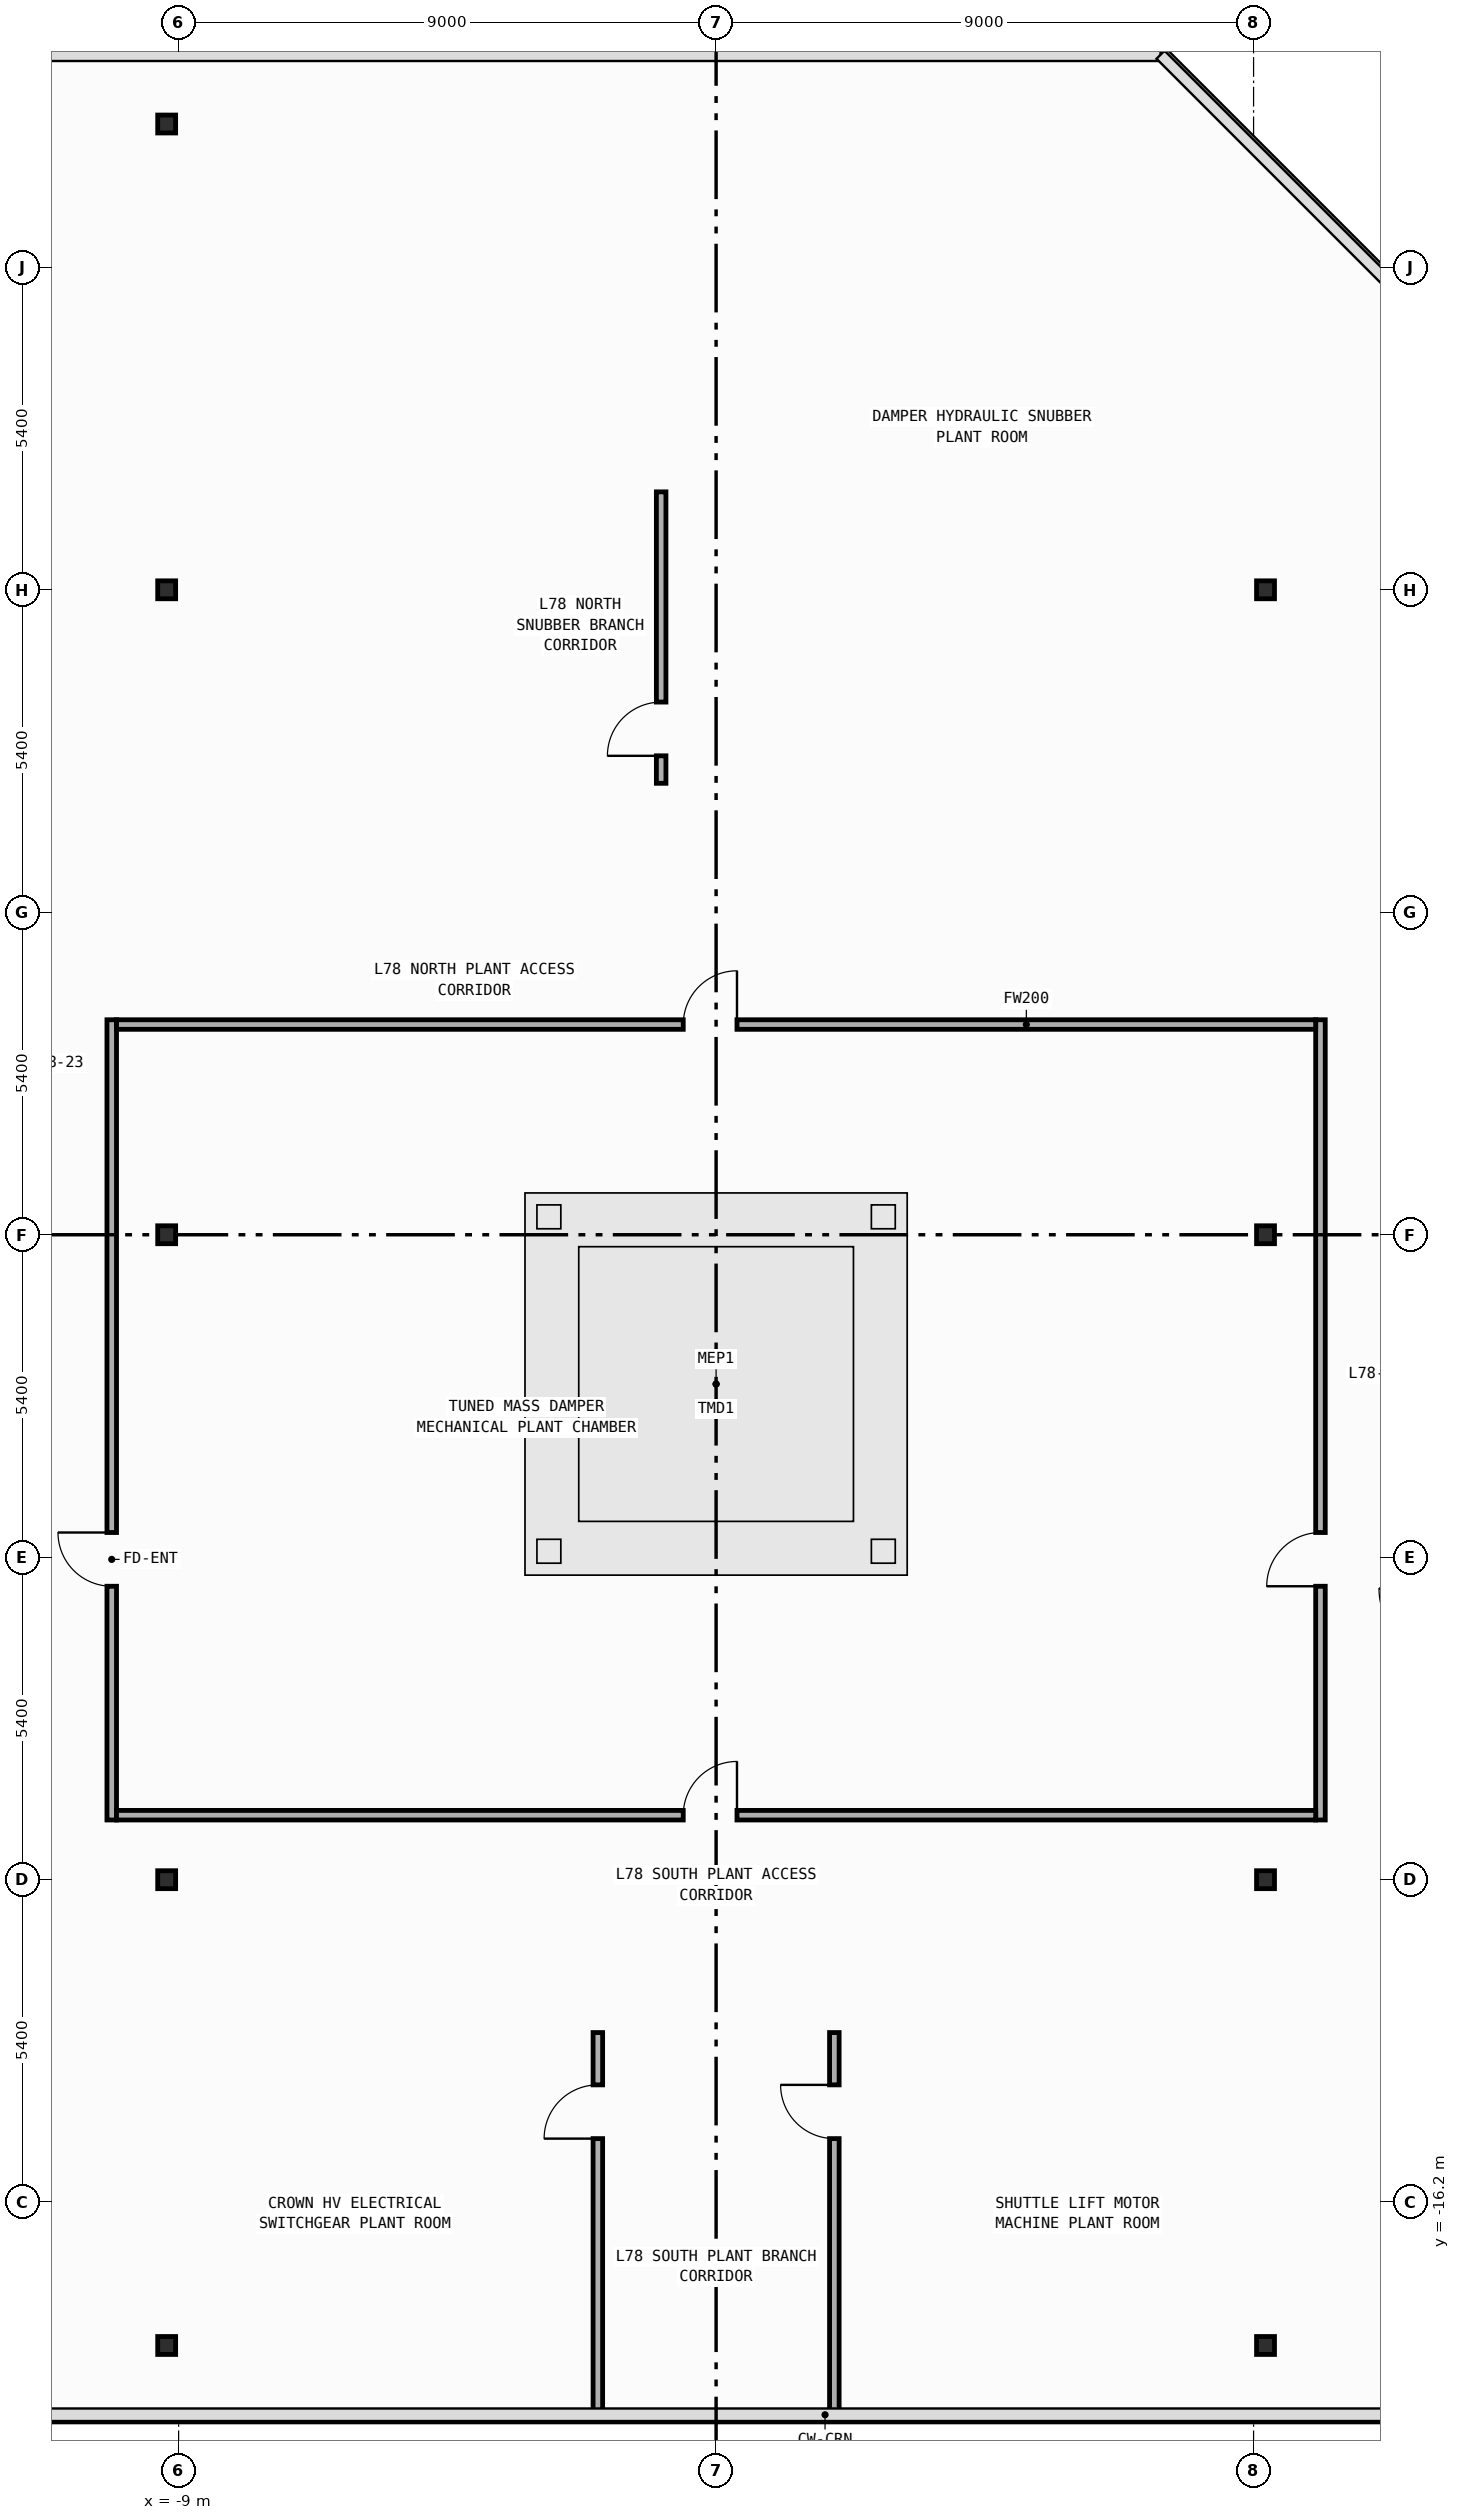
"""IFC4 building model, lengths in metres.
Left out: names, types, materials, properties, quantities, classifications, styles, units other than length and angle.
Written with IfcOpenShell. Run it as: python <this file> out.ifc"""

import sys

from ifc_helpers import new_model, si_unit, direction, frame, frame_2d, origin, origin_2d, place, context, subcontext, project, spatial, rectangle, i_section, extrude, element, fill, save


model = new_model("IFC4")
c1 = context("Model", 3, precision=1e-05, world=origin(), true_north=direction((0.0, 1.0)))
c2 = subcontext(c1, "Body", "Model", "MODEL_VIEW")
j1 = project(units=[si_unit("LENGTHUNIT", "METRE"), si_unit("PLANEANGLEUNIT", "RADIAN")], contexts=[c1])
p1 = place(None, origin())
s1 = spatial("IfcSite", under=j1, at=p1, CompositionType="ELEMENT")
p2 = place(p1, origin())
s2 = spatial("IfcBuilding", under=s1, at=p2, CompositionType="ELEMENT")
p3 = place(p2, frame((0.0, 0.0, 325.2)))
s3 = spatial("IfcBuildingStorey", under=s2, at=p3, CompositionType="ELEMENT", Elevation=325.2)
for number, where, z_axis, x_axis in (
    (1, (-9.2, -18.6, 0.0), (0.0, 0.0, 1.0), (1.0, 0.0, 0.0)),
    (2, (-9.2, -10.8, 0.0), (0.0, 0.0, 1.0), (1.0, 0.0, 0.0)),
    (3, (-9.2, 0.0, 0.0), (0.0, 0.0, 1.0), (1.0, 0.0, 0.0)),
    (4, (-9.2, 10.8, 0.0), (0.0, 0.0, 1.0), (1.0, 0.0, 0.0)),
    (5, (-9.2, 18.6, 0.0), (0.0, 0.0, 1.0), (1.0, 0.0, 0.0)),
    (6, (9.2, -18.6, 0.0), (0.0, 0.0, 1.0), (1.0, 0.0, 0.0)),
    (7, (9.2, -10.8, 0.0), (0.0, 0.0, 1.0), (1.0, 0.0, 0.0)),
    (8, (9.2, 0.0, 0.0), (0.0, 0.0, 1.0), (1.0, 0.0, 0.0)),
    (9, (9.2, 10.8, 0.0), (0.0, 0.0, 1.0), (1.0, 0.0, 0.0)),
):
    element("IfcColumn", number, at=place(p3, frame(where, z_axis=z_axis, x_axis=x_axis)), inside=s3, PredefinedType="COLUMN", context=c2, shape_type="SweptSolid", body=[
        extrude(i_section(OverallWidth=0.3, OverallDepth=0.3, WebThickness=0.01, FlangeThickness=0.015, FilletRadius=0.018, at=origin_2d()), origin(), (0.0, 0.0, 1.0), 5.2),
    ])
p4 = place(p3, frame((-10.12, -9.8, 0.0), z_axis=(0.0, 0.0, 1.0), x_axis=(0.0, 1.0, 0.0)))
e10 = element("IfcWall", 10, at=p4, inside=s3, PredefinedType="PARTITIONING", context=c2, shape_type="SweptSolid", body=[
    extrude(rectangle(XDim=13.4, YDim=0.16, at=frame_2d((6.7, 0.0))), origin(), (0.0, 0.0, 1.0), 4.94),
])
p5 = place(p4, frame((3.914, 0.0, 0.0)))
e11 = element("IfcOpeningElement", 11, at=p5, cuts=e10, PredefinedType="OPENING", context=c2, shape_type="SweptSolid", body=[
    extrude(rectangle(XDim=0.9, YDim=2.15, at=frame_2d((0.45, 1.075))), frame((0.0, 0.09, 0.0), z_axis=(0.0, -1.0, 0.0), x_axis=(1.0, 0.0, 0.0)), (0.0, 0.0, 1.0), 0.18),
])
p6 = place(p3, frame((10.12, -9.8, 0.0), z_axis=(0.0, 0.0, 1.0), x_axis=(0.0, 1.0, 0.0)))
e12 = element("IfcWall", 12, at=p6, inside=s3, PredefinedType="PARTITIONING", context=c2, shape_type="SweptSolid", body=[
    extrude(rectangle(XDim=13.4, YDim=0.16, at=frame_2d((6.7, 0.0))), origin(), (0.0, 0.0, 1.0), 4.94),
])
p7 = place(p6, frame((3.914, 0.0, 0.0)))
e13 = element("IfcOpeningElement", 13, at=p7, cuts=e12, PredefinedType="OPENING", context=c2, shape_type="SweptSolid", body=[
    extrude(rectangle(XDim=0.9, YDim=2.15, at=frame_2d((0.45, 1.075))), frame((0.0, 0.09, 0.0), z_axis=(0.0, -1.0, 0.0), x_axis=(1.0, 0.0, 0.0)), (0.0, 0.0, 1.0), 0.18),
])
p8 = place(p3, frame((-10.04, 3.52, 0.0), z_axis=(0.0, 0.0, 1.0), x_axis=(1.0, 0.0, 0.0)))
e14 = element("IfcWall", 14, at=p8, inside=s3, PredefinedType="PARTITIONING", context=c2, shape_type="SweptSolid", body=[
    extrude(rectangle(XDim=20.08, YDim=0.16, at=frame_2d((10.04, 0.0))), origin(), (0.0, 0.0, 1.0), 4.94),
])
p9 = place(p8, frame((9.49, 0.0, 0.0)))
e15 = element("IfcOpeningElement", 15, at=p9, cuts=e14, PredefinedType="OPENING", context=c2, shape_type="SweptSolid", body=[
    extrude(rectangle(XDim=0.9, YDim=2.15, at=frame_2d((0.45, 1.075))), frame((0.0, 0.09, 0.0), z_axis=(0.0, -1.0, 0.0), x_axis=(1.0, 0.0, 0.0)), (0.0, 0.0, 1.0), 0.18),
])
p10 = place(p3, frame((-0.92, 7.56, 0.0), z_axis=(0.0, 0.0, 1.0), x_axis=(0.0, 1.0, 0.0)))
e16 = element("IfcWall", 16, at=p10, inside=s3, PredefinedType="PARTITIONING", context=c2, shape_type="SweptSolid", body=[
    extrude(rectangle(XDim=4.88, YDim=0.16, at=frame_2d((2.44, 0.0))), origin(), (0.0, 0.0, 1.0), 4.94),
])
p11 = place(p10, frame((0.46, 0.0, 0.0)))
e17 = element("IfcOpeningElement", 17, at=p11, cuts=e16, PredefinedType="OPENING", context=c2, shape_type="SweptSolid", body=[
    extrude(rectangle(XDim=0.9, YDim=2.15, at=frame_2d((0.45, 1.075))), frame((0.0, 0.09, 0.0), z_axis=(0.0, -1.0, 0.0), x_axis=(1.0, 0.0, 0.0)), (0.0, 0.0, 1.0), 0.18),
])
p12 = place(p3, frame((-10.04, -9.72, 0.0), z_axis=(0.0, 0.0, 1.0), x_axis=(1.0, 0.0, 0.0)))
e18 = element("IfcWall", 18, at=p12, inside=s3, PredefinedType="PARTITIONING", context=c2, shape_type="SweptSolid", body=[
    extrude(rectangle(XDim=20.08, YDim=0.16, at=frame_2d((10.04, 0.0))), origin(), (0.0, 0.0, 1.0), 4.94),
])
p13 = place(p12, frame((9.49, 0.0, 0.0)))
e19 = element("IfcOpeningElement", 19, at=p13, cuts=e18, PredefinedType="OPENING", context=c2, shape_type="SweptSolid", body=[
    extrude(rectangle(XDim=0.9, YDim=2.15, at=frame_2d((0.45, 1.075))), frame((0.0, 0.09, 0.0), z_axis=(0.0, -1.0, 0.0), x_axis=(1.0, 0.0, 0.0)), (0.0, 0.0, 1.0), 0.18),
])
p14 = place(p3, frame((-1.98, -19.755, 0.0), z_axis=(0.0, 0.0, 1.0), x_axis=(0.0, 1.0, 0.0)))
e20 = element("IfcWall", 20, at=p14, inside=s3, PredefinedType="PARTITIONING", context=c2, shape_type="SweptSolid", body=[
    extrude(rectangle(XDim=6.395, YDim=0.16, at=frame_2d((3.197, 0.0))), origin(), (0.0, 0.0, 1.0), 4.94),
])
p15 = place(p14, frame((4.619, 0.0, 0.0)))
e21 = element("IfcOpeningElement", 21, at=p15, cuts=e20, PredefinedType="OPENING", context=c2, shape_type="SweptSolid", body=[
    extrude(rectangle(XDim=0.9, YDim=2.15, at=frame_2d((0.45, 1.075))), frame((0.0, 0.09, 0.0), z_axis=(0.0, -1.0, 0.0), x_axis=(1.0, 0.0, 0.0)), (0.0, 0.0, 1.0), 0.18),
])
p16 = place(p3, frame((1.98, -19.755, 0.0), z_axis=(0.0, 0.0, 1.0), x_axis=(0.0, 1.0, 0.0)))
e22 = element("IfcWall", 22, at=p16, inside=s3, PredefinedType="PARTITIONING", context=c2, shape_type="SweptSolid", body=[
    extrude(rectangle(XDim=6.395, YDim=0.16, at=frame_2d((3.197, 0.0))), origin(), (0.0, 0.0, 1.0), 4.94),
])
p17 = place(p16, frame((4.619, 0.0, 0.0)))
e23 = element("IfcOpeningElement", 23, at=p17, cuts=e22, PredefinedType="OPENING", context=c2, shape_type="SweptSolid", body=[
    extrude(rectangle(XDim=0.9, YDim=2.15, at=frame_2d((0.45, 1.075))), frame((0.0, 0.09, 0.0), z_axis=(0.0, -1.0, 0.0), x_axis=(1.0, 0.0, 0.0)), (0.0, 0.0, 1.0), 0.18),
])
p18 = place(p5, origin())
e24 = element("IfcDoor", 24, at=p18, inside=s3, OperationType="SINGLE_SWING_RIGHT", PredefinedType="DOOR", context=c2, shape_type="SweptSolid", body=[
    extrude(rectangle(XDim=0.9, YDim=2.15, at=frame_2d((0.45, 1.075))), frame((0.0, 0.025, 0.0), z_axis=(0.0, -1.0, 0.0), x_axis=(1.0, 0.0, 0.0)), (0.0, 0.0, 1.0), 0.05),
])
fill(e11, e24)
p19 = place(p7, origin())
e25 = element("IfcDoor", 25, at=p19, inside=s3, OperationType="SINGLE_SWING_LEFT", PredefinedType="DOOR", context=c2, shape_type="SweptSolid", body=[
    extrude(rectangle(XDim=0.9, YDim=2.15, at=frame_2d((0.45, 1.075))), frame((0.0, 0.025, 0.0), z_axis=(0.0, -1.0, 0.0), x_axis=(1.0, 0.0, 0.0)), (0.0, 0.0, 1.0), 0.05),
])
fill(e13, e25)
p20 = place(p9, origin())
e26 = element("IfcDoor", 26, at=p20, inside=s3, OperationType="SINGLE_SWING_RIGHT", PredefinedType="DOOR", context=c2, shape_type="SweptSolid", body=[
    extrude(rectangle(XDim=0.9, YDim=2.15, at=frame_2d((0.45, 1.075))), frame((0.0, 0.025, 0.0), z_axis=(0.0, -1.0, 0.0), x_axis=(1.0, 0.0, 0.0)), (0.0, 0.0, 1.0), 0.05),
])
fill(e15, e26)
p21 = place(p11, origin())
e27 = element("IfcDoor", 27, at=p21, inside=s3, OperationType="SINGLE_SWING_LEFT", PredefinedType="DOOR", context=c2, shape_type="SweptSolid", body=[
    extrude(rectangle(XDim=0.9, YDim=2.15, at=frame_2d((0.45, 1.075))), frame((0.0, 0.025, 0.0), z_axis=(0.0, -1.0, 0.0), x_axis=(1.0, 0.0, 0.0)), (0.0, 0.0, 1.0), 0.05),
])
fill(e17, e27)
p22 = place(p13, origin())
e28 = element("IfcDoor", 28, at=p22, inside=s3, OperationType="SINGLE_SWING_RIGHT", PredefinedType="DOOR", context=c2, shape_type="SweptSolid", body=[
    extrude(rectangle(XDim=0.9, YDim=2.15, at=frame_2d((0.45, 1.075))), frame((0.0, 0.025, 0.0), z_axis=(0.0, -1.0, 0.0), x_axis=(1.0, 0.0, 0.0)), (0.0, 0.0, 1.0), 0.05),
])
fill(e19, e28)
p23 = place(p15, origin())
e29 = element("IfcDoor", 29, at=p23, inside=s3, OperationType="SINGLE_SWING_LEFT", PredefinedType="DOOR", context=c2, shape_type="SweptSolid", body=[
    extrude(rectangle(XDim=0.9, YDim=2.15, at=frame_2d((0.45, 1.075))), frame((0.0, 0.025, 0.0), z_axis=(0.0, -1.0, 0.0), x_axis=(1.0, 0.0, 0.0)), (0.0, 0.0, 1.0), 0.05),
])
fill(e21, e29)
p24 = place(p17, origin())
e30 = element("IfcDoor", 30, at=p24, inside=s3, OperationType="SINGLE_SWING_RIGHT", PredefinedType="DOOR", context=c2, shape_type="SweptSolid", body=[
    extrude(rectangle(XDim=0.9, YDim=2.15, at=frame_2d((0.45, 1.075))), frame((0.0, 0.025, 0.0), z_axis=(0.0, -1.0, 0.0), x_axis=(1.0, 0.0, 0.0)), (0.0, 0.0, 1.0), 0.05),
])
fill(e23, e30)
save(model, sys.argv[1])
